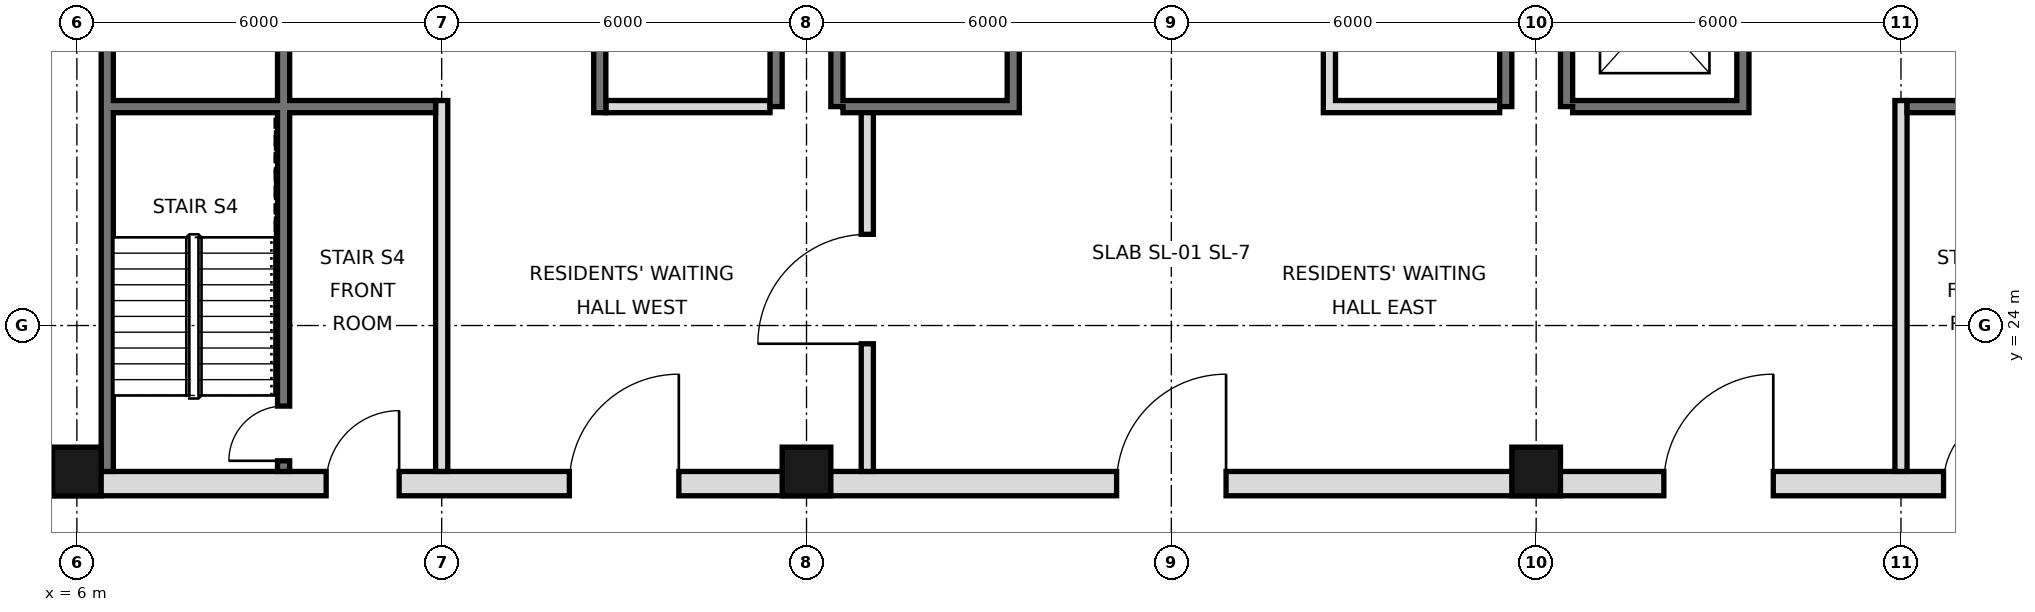
"""IFC4 building model, lengths in metres.
Left out: names, types, materials, properties, quantities, classifications, styles, units other than length and angle.
Written with IfcOpenShell. Run it as: python <this file> out.ifc"""

import sys

from ifc_helpers import new_model, si_unit, direction, frame, frame_2d, origin, origin_2d, place, context, subcontext, project, spatial, rectangle, hollow_rectangle, extrude, element, fill, save


model = new_model("IFC4")
c1 = context("Model", 3, precision=1e-05, world=origin(), true_north=direction((0.0, 1.0)))
c2 = subcontext(c1, "Body", "Model", "MODEL_VIEW")
j1 = project(units=[si_unit("LENGTHUNIT", "METRE"), si_unit("PLANEANGLEUNIT", "RADIAN")], contexts=[c1])
p1 = place(None, origin())
s1 = spatial("IfcSite", under=j1, at=p1, CompositionType="ELEMENT")
p2 = place(p1, origin())
s2 = spatial("IfcBuilding", under=s1, at=p2, CompositionType="ELEMENT")
p3 = place(p2, frame((0.0, 0.0, 178.0)))
s3 = spatial("IfcBuildingStorey", under=s2, at=p3, CompositionType="ELEMENT", Elevation=178.0)
for number, where, z_axis, x_axis in (
    (1, (6.0, 21.6, 0.0), (0.0, 0.0, 1.0), (1.0, 0.0, 0.0)),
    (2, (18.0, 21.6, 0.0), (0.0, 0.0, 1.0), (1.0, 0.0, 0.0)),
    (3, (30.0, 21.6, 0.0), (0.0, 0.0, 1.0), (1.0, 0.0, 0.0)),
):
    element("IfcColumn", number, at=place(p3, frame(where, z_axis=z_axis, x_axis=x_axis)), inside=s3, PredefinedType="COLUMN", context=c2, shape_type="SweptSolid", body=[
        extrude(hollow_rectangle(XDim=0.8, YDim=0.8, WallThickness=0.045, at=origin_2d()), origin(), (0.0, 0.0, 1.0), 3.6),
    ])
p4 = place(p3, frame((6.5, 21.6, 0.0), z_axis=(0.0, 0.0, 1.0), x_axis=(0.0, 1.0, 0.0)))
e4 = element("IfcWall", 4, at=p4, inside=s3, PredefinedType="SOLIDWALL", context=c2, shape_type="SweptSolid", body=[
    extrude(rectangle(XDim=23.5, YDim=0.2, at=frame_2d((11.75, 0.0))), origin(), (0.0, 0.0, 1.0), 3.42),
])
for number, where, z_axis, x_axis in (
    (5, (17.5, 27.6, 0.0), (0.0, 0.0, 1.0), (0.0, 1.0, 0.0)),
    (6, (18.5, 27.6, 0.0), (0.0, 0.0, 1.0), (0.0, 1.0, 0.0)),
    (7, (29.5, 27.6, 0.0), (0.0, 0.0, 1.0), (0.0, 1.0, 0.0)),
    (8, (30.5, 27.6, 0.0), (0.0, 0.0, 1.0), (0.0, 1.0, 0.0)),
):
    element("IfcWall", number, at=place(p3, frame(where, z_axis=z_axis, x_axis=x_axis)), inside=s3, PredefinedType="SOLIDWALL", context=c2, shape_type="SweptSolid", body=[
        extrude(rectangle(XDim=17.5, YDim=0.2, at=frame_2d((8.75, 0.0))), origin(), (0.0, 0.0, 1.0), 3.42),
    ])
p5 = place(p3, frame((5.6, 21.4, 0.0), z_axis=(0.0, 0.0, 1.0), x_axis=(1.0, 0.0, 0.0)))
e9 = element("IfcWall", 9, at=p5, inside=s3, PredefinedType="SOLIDWALL", context=c2, shape_type="SweptSolid", body=[
    extrude(rectangle(XDim=36.8, YDim=0.4, at=frame_2d((18.4, 0.0))), origin(), (0.0, 0.0, 1.0), 3.42),
])
p6 = place(p5, frame((8.5, 0.0, 0.0)))
e10 = element("IfcOpeningElement", 10, at=p6, cuts=e9, PredefinedType="OPENING", context=c2, shape_type="SweptSolid", body=[
    extrude(rectangle(XDim=1.8, YDim=2.1, at=frame_2d((0.9, 1.05))), frame((0.0, 0.21, 0.0), z_axis=(0.0, -1.0, 0.0), x_axis=(1.0, 0.0, 0.0)), (0.0, 0.0, 1.0), 0.42),
])
p7 = place(p5, frame((17.5, 0.0, 0.0)))
e11 = element("IfcOpeningElement", 11, at=p7, cuts=e9, PredefinedType="OPENING", context=c2, shape_type="SweptSolid", body=[
    extrude(rectangle(XDim=1.8, YDim=2.1, at=frame_2d((0.9, 1.05))), frame((0.0, 0.21, 0.0), z_axis=(0.0, -1.0, 0.0), x_axis=(1.0, 0.0, 0.0)), (0.0, 0.0, 1.0), 0.42),
])
p8 = place(p5, frame((26.5, 0.0, 0.0)))
e12 = element("IfcOpeningElement", 12, at=p8, cuts=e9, PredefinedType="OPENING", context=c2, shape_type="SweptSolid", body=[
    extrude(rectangle(XDim=1.8, YDim=2.1, at=frame_2d((0.9, 1.05))), frame((0.0, 0.21, 0.0), z_axis=(0.0, -1.0, 0.0), x_axis=(1.0, 0.0, 0.0)), (0.0, 0.0, 1.0), 0.42),
])
p9 = place(p5, frame((4.5, 0.0, 0.0)))
e13 = element("IfcOpeningElement", 13, at=p9, cuts=e9, PredefinedType="OPENING", context=c2, shape_type="SweptSolid", body=[
    extrude(rectangle(XDim=1.2, YDim=2.1, at=frame_2d((0.6, 1.05))), frame((0.0, 0.21, 0.0), z_axis=(0.0, -1.0, 0.0), x_axis=(1.0, 0.0, 0.0)), (0.0, 0.0, 1.0), 0.42),
])
p10 = place(p5, frame((31.1, 0.0, 0.0)))
e14 = element("IfcOpeningElement", 14, at=p10, cuts=e9, PredefinedType="OPENING", context=c2, shape_type="SweptSolid", body=[
    extrude(rectangle(XDim=1.2, YDim=2.1, at=frame_2d((0.6, 1.05))), frame((0.0, 0.21, 0.0), z_axis=(0.0, -1.0, 0.0), x_axis=(1.0, 0.0, 0.0)), (0.0, 0.0, 1.0), 0.42),
])
p11 = place(p3, frame((19.0, 21.6, 0.0), z_axis=(0.0, 0.0, 1.0), x_axis=(0.0, 1.0, 0.0)))
e15 = element("IfcWall", 15, at=p11, inside=s3, PredefinedType="PARTITIONING", context=c2, shape_type="SweptSolid", body=[
    extrude(rectangle(XDim=6.0, YDim=0.2, at=frame_2d((3.0, 0.0))), origin(), (0.0, 0.0, 1.0), 3.42),
])
p12 = place(p11, frame((2.1, 0.0, 0.0)))
e16 = element("IfcOpeningElement", 16, at=p12, cuts=e15, PredefinedType="OPENING", context=c2, shape_type="SweptSolid", body=[
    extrude(rectangle(XDim=1.8, YDim=2.1, at=frame_2d((0.9, 1.05))), frame((0.0, 0.11, 0.0), z_axis=(0.0, -1.0, 0.0), x_axis=(1.0, 0.0, 0.0)), (0.0, 0.0, 1.0), 0.22),
])
p13 = place(p3, frame((12.0, 21.6, 0.0), z_axis=(0.0, 0.0, 1.0), x_axis=(0.0, 1.0, 0.0)))
e17 = element("IfcWall", 17, at=p13, inside=s3, PredefinedType="PARTITIONING", context=c2, shape_type="SweptSolid", body=[
    extrude(rectangle(XDim=6.1, YDim=0.2, at=frame_2d((3.05, 0.0))), origin(), (0.0, 0.0, 1.0), 3.42),
])
p14 = place(p3, frame((14.6, 27.5, 0.0), z_axis=(0.0, 0.0, 1.0), x_axis=(0.0, 1.0, 0.0)))
e18 = element("IfcWall", 18, at=p14, inside=s3, PredefinedType="SOLIDWALL", context=c2, shape_type="SweptSolid", body=[
    extrude(rectangle(XDim=17.5, YDim=0.2, at=frame_2d((8.75, 0.0))), origin(), (0.0, 0.0, 1.0), 3.42),
])
p15 = place(p14, frame((15.4, 0.0, 0.0)))
e19 = element("IfcOpeningElement", 19, at=p15, cuts=e18, PredefinedType="OPENING", context=c2, shape_type="SweptSolid", body=[
    extrude(rectangle(XDim=1.1, YDim=2.1, at=frame_2d((0.55, 1.05))), frame((0.0, 0.11, 0.0), z_axis=(0.0, -1.0, 0.0), x_axis=(1.0, 0.0, 0.0)), (0.0, 0.0, 1.0), 0.22),
])
p16 = place(p14, frame((2.7, 0.0, 0.0)))
e20 = element("IfcOpeningElement", 20, at=p16, cuts=e18, PredefinedType="OPENING", context=c2, shape_type="SweptSolid", body=[
    extrude(rectangle(XDim=1.0, YDim=2.1, at=frame_2d((0.5, 1.05))), frame((0.0, 0.11, 0.0), z_axis=(0.0, -1.0, 0.0), x_axis=(1.0, 0.0, 0.0)), (0.0, 0.0, 1.0), 0.22),
])
p17 = place(p14, frame((9.9, 0.0, 0.0)))
e21 = element("IfcOpeningElement", 21, at=p17, cuts=e18, PredefinedType="OPENING", context=c2, shape_type="SweptSolid", body=[
    extrude(rectangle(XDim=0.9, YDim=2.1, at=frame_2d((0.45, 1.05))), frame((0.0, 0.11, 0.0), z_axis=(0.0, -1.0, 0.0), x_axis=(1.0, 0.0, 0.0)), (0.0, 0.0, 1.0), 0.22),
])
p18 = place(p3, frame((21.4, 27.5, 0.0), z_axis=(0.0, 0.0, 1.0), x_axis=(0.0, 1.0, 0.0)))
e22 = element("IfcWall", 22, at=p18, inside=s3, PredefinedType="SOLIDWALL", context=c2, shape_type="SweptSolid", body=[
    extrude(rectangle(XDim=17.5, YDim=0.2, at=frame_2d((8.75, 0.0))), origin(), (0.0, 0.0, 1.0), 3.42),
])
p19 = place(p18, frame((9.8, 0.0, 0.0)))
e23 = element("IfcOpeningElement", 23, at=p19, cuts=e22, PredefinedType="OPENING", context=c2, shape_type="SweptSolid", body=[
    extrude(rectangle(XDim=1.0, YDim=2.1, at=frame_2d((0.5, 1.05))), frame((0.0, 0.11, 0.0), z_axis=(0.0, -1.0, 0.0), x_axis=(1.0, 0.0, 0.0)), (0.0, 0.0, 1.0), 0.22),
])
p20 = place(p18, frame((7.4, 0.0, 0.0)))
e24 = element("IfcOpeningElement", 24, at=p20, cuts=e22, PredefinedType="OPENING", context=c2, shape_type="SweptSolid", body=[
    extrude(rectangle(XDim=0.9, YDim=2.1, at=frame_2d((0.45, 1.05))), frame((0.0, 0.11, 0.0), z_axis=(0.0, -1.0, 0.0), x_axis=(1.0, 0.0, 0.0)), (0.0, 0.0, 1.0), 0.22),
])
p21 = place(p3, frame((26.6, 27.5, 0.0), z_axis=(0.0, 0.0, 1.0), x_axis=(0.0, 1.0, 0.0)))
e25 = element("IfcWall", 25, at=p21, inside=s3, PredefinedType="SOLIDWALL", context=c2, shape_type="SweptSolid", body=[
    extrude(rectangle(XDim=17.5, YDim=0.2, at=frame_2d((8.75, 0.0))), origin(), (0.0, 0.0, 1.0), 3.42),
])
p22 = place(p21, frame((4.3, 0.0, 0.0)))
e26 = element("IfcOpeningElement", 26, at=p22, cuts=e25, PredefinedType="OPENING", context=c2, shape_type="SweptSolid", body=[
    extrude(rectangle(XDim=0.9, YDim=2.1, at=frame_2d((0.45, 1.05))), frame((0.0, 0.11, 0.0), z_axis=(0.0, -1.0, 0.0), x_axis=(1.0, 0.0, 0.0)), (0.0, 0.0, 1.0), 0.22),
])
p23 = place(p21, frame((10.35, 0.0, 0.0)))
e27 = element("IfcOpeningElement", 27, at=p23, cuts=e25, PredefinedType="OPENING", context=c2, shape_type="SweptSolid", body=[
    extrude(rectangle(XDim=1.0, YDim=2.1, at=frame_2d((0.5, 1.05))), frame((0.0, 0.11, 0.0), z_axis=(0.0, -1.0, 0.0), x_axis=(1.0, 0.0, 0.0)), (0.0, 0.0, 1.0), 0.22),
])
p24 = place(p3, frame((33.4, 27.5, 0.0), z_axis=(0.0, 0.0, 1.0), x_axis=(0.0, 1.0, 0.0)))
e28 = element("IfcWall", 28, at=p24, inside=s3, PredefinedType="SOLIDWALL", context=c2, shape_type="SweptSolid", body=[
    extrude(rectangle(XDim=17.5, YDim=0.2, at=frame_2d((8.75, 0.0))), origin(), (0.0, 0.0, 1.0), 3.42),
])
p25 = place(p24, frame((1.1, 0.0, 0.0)))
e29 = element("IfcOpeningElement", 29, at=p25, cuts=e28, PredefinedType="OPENING", context=c2, shape_type="SweptSolid", body=[
    extrude(rectangle(XDim=1.1, YDim=2.1, at=frame_2d((0.55, 1.05))), frame((0.0, 0.11, 0.0), z_axis=(0.0, -1.0, 0.0), x_axis=(1.0, 0.0, 0.0)), (0.0, 0.0, 1.0), 0.22),
])
p26 = place(p24, frame((4.2, 0.0, 0.0)))
e30 = element("IfcOpeningElement", 30, at=p26, cuts=e28, PredefinedType="OPENING", context=c2, shape_type="SweptSolid", body=[
    extrude(rectangle(XDim=1.1, YDim=2.1, at=frame_2d((0.55, 1.05))), frame((0.0, 0.11, 0.0), z_axis=(0.0, -1.0, 0.0), x_axis=(1.0, 0.0, 0.0)), (0.0, 0.0, 1.0), 0.22),
])
p27 = place(p24, frame((15.4, 0.0, 0.0)))
e31 = element("IfcOpeningElement", 31, at=p27, cuts=e28, PredefinedType="OPENING", context=c2, shape_type="SweptSolid", body=[
    extrude(rectangle(XDim=1.1, YDim=2.1, at=frame_2d((0.55, 1.05))), frame((0.0, 0.11, 0.0), z_axis=(0.0, -1.0, 0.0), x_axis=(1.0, 0.0, 0.0)), (0.0, 0.0, 1.0), 0.22),
])
p28 = place(p24, frame((9.9, 0.0, 0.0)))
e32 = element("IfcOpeningElement", 32, at=p28, cuts=e28, PredefinedType="OPENING", context=c2, shape_type="SweptSolid", body=[
    extrude(rectangle(XDim=0.9, YDim=2.1, at=frame_2d((0.45, 1.05))), frame((0.0, 0.11, 0.0), z_axis=(0.0, -1.0, 0.0), x_axis=(1.0, 0.0, 0.0)), (0.0, 0.0, 1.0), 0.22),
])
p29 = place(p3, frame((36.0, 21.6, 0.0), z_axis=(0.0, 0.0, 1.0), x_axis=(0.0, 1.0, 0.0)))
e33 = element("IfcWall", 33, at=p29, inside=s3, PredefinedType="PARTITIONING", context=c2, shape_type="SweptSolid", body=[
    extrude(rectangle(XDim=6.1, YDim=0.2, at=frame_2d((3.05, 0.0))), origin(), (0.0, 0.0, 1.0), 3.42),
])
p30 = place(p3, frame((9.4, 21.6, 0.0), z_axis=(0.0, 0.0, 1.0), x_axis=(0.0, 1.0, 0.0)))
e34 = element("IfcWall", 34, at=p30, inside=s3, PredefinedType="SOLIDWALL", context=c2, shape_type="SweptSolid", body=[
    extrude(rectangle(XDim=23.4, YDim=0.2, at=frame_2d((11.7, 0.0))), origin(), (0.0, 0.0, 1.0), 3.42),
])
p31 = place(p30, frame((7.95, 0.0, 0.0)))
e35 = element("IfcOpeningElement", 35, at=p31, cuts=e34, PredefinedType="OPENING", context=c2, shape_type="SweptSolid", body=[
    extrude(rectangle(XDim=1.0, YDim=2.1, at=frame_2d((0.5, 1.05))), frame((0.0, 0.11, 0.0), z_axis=(0.0, -1.0, 0.0), x_axis=(1.0, 0.0, 0.0)), (0.0, 0.0, 1.0), 0.22),
])
p32 = place(p30, frame((12.6, 0.0, 0.0)))
e36 = element("IfcOpeningElement", 36, at=p32, cuts=e34, PredefinedType="OPENING", context=c2, shape_type="SweptSolid", body=[
    extrude(rectangle(XDim=1.0, YDim=2.1, at=frame_2d((0.5, 1.05))), frame((0.0, 0.11, 0.0), z_axis=(0.0, -1.0, 0.0), x_axis=(1.0, 0.0, 0.0)), (0.0, 0.0, 1.0), 0.22),
])
p33 = place(p30, frame((15.7, 0.0, 0.0)))
e37 = element("IfcOpeningElement", 37, at=p33, cuts=e34, PredefinedType="OPENING", context=c2, shape_type="SweptSolid", body=[
    extrude(rectangle(XDim=1.0, YDim=2.1, at=frame_2d((0.5, 1.05))), frame((0.0, 0.11, 0.0), z_axis=(0.0, -1.0, 0.0), x_axis=(1.0, 0.0, 0.0)), (0.0, 0.0, 1.0), 0.22),
])
p34 = place(p30, frame((0.175, 0.0, 0.0)))
e38 = element("IfcOpeningElement", 38, at=p34, cuts=e34, PredefinedType="OPENING", context=c2, shape_type="SweptSolid", body=[
    extrude(rectangle(XDim=0.9, YDim=2.1, at=frame_2d((0.45, 1.05))), frame((0.0, 0.11, 0.0), z_axis=(0.0, -1.0, 0.0), x_axis=(1.0, 0.0, 0.0)), (0.0, 0.0, 1.0), 0.22),
])
p35 = place(p3, frame((14.7, 27.6, 0.0), z_axis=(0.0, 0.0, 1.0), x_axis=(1.0, 0.0, 0.0)))
e39 = element("IfcWall", 39, at=p35, inside=s3, PredefinedType="PARTITIONING", context=c2, shape_type="SweptSolid", body=[
    extrude(rectangle(XDim=2.7, YDim=0.2, at=frame_2d((1.35, 0.0))), origin(), (0.0, 0.0, 1.0), 3.42),
])
for number, where, z_axis, x_axis in (
    (40, (18.6, 27.6, 0.0), (0.0, 0.0, 1.0), (1.0, 0.0, 0.0)),
    (41, (26.7, 27.6, 0.0), (0.0, 0.0, 1.0), (1.0, 0.0, 0.0)),
    (42, (30.6, 27.6, 0.0), (0.0, 0.0, 1.0), (1.0, 0.0, 0.0)),
):
    element("IfcWall", number, at=place(p3, frame(where, z_axis=z_axis, x_axis=x_axis)), inside=s3, PredefinedType="SOLIDWALL", context=c2, shape_type="SweptSolid", body=[
        extrude(rectangle(XDim=2.7, YDim=0.2, at=frame_2d((1.35, 0.0))), origin(), (0.0, 0.0, 1.0), 3.42),
    ])
for number, where, z_axis, x_axis in (
    (43, (36.1, 27.6, 0.0), (0.0, 0.0, 1.0), (1.0, 0.0, 0.0)),
    (44, (6.6, 27.6, 0.0), (0.0, 0.0, 1.0), (1.0, 0.0, 0.0)),
):
    element("IfcWall", number, at=place(p3, frame(where, z_axis=z_axis, x_axis=x_axis)), inside=s3, PredefinedType="SOLIDWALL", context=c2, shape_type="SweptSolid", body=[
        extrude(rectangle(XDim=5.3, YDim=0.2, at=frame_2d((2.65, 0.0))), origin(), (0.0, 0.0, 1.0), 3.42),
    ])
p36 = place(p6, frame((1.8, 0.0, 0.0), z_axis=(0.0, 0.0, 1.0), x_axis=(-1.0, 0.0, 0.0)))
e45 = element("IfcDoor", 45, at=p36, inside=s3, OperationType="SINGLE_SWING_LEFT", PredefinedType="DOOR", context=c2, shape_type="SweptSolid", body=[
    extrude(rectangle(XDim=1.8, YDim=2.1, at=frame_2d((0.9, 1.05))), frame((0.0, 0.025, 0.0), z_axis=(0.0, -1.0, 0.0), x_axis=(1.0, 0.0, 0.0)), (0.0, 0.0, 1.0), 0.05),
])
fill(e10, e45)
p37 = place(p12, origin())
e46 = element("IfcDoor", 46, at=p37, inside=s3, OperationType="SINGLE_SWING_LEFT", PredefinedType="DOOR", context=c2, shape_type="SweptSolid", body=[
    extrude(rectangle(XDim=1.8, YDim=2.1, at=frame_2d((0.9, 1.05))), frame((0.0, 0.025, 0.0), z_axis=(0.0, -1.0, 0.0), x_axis=(1.0, 0.0, 0.0)), (0.0, 0.0, 1.0), 0.05),
])
fill(e16, e46)
p38 = place(p7, frame((1.8, 0.0, 0.0), z_axis=(0.0, 0.0, 1.0), x_axis=(-1.0, 0.0, 0.0)))
e47 = element("IfcDoor", 47, at=p38, inside=s3, OperationType="SINGLE_SWING_LEFT", PredefinedType="DOOR", context=c2, shape_type="SweptSolid", body=[
    extrude(rectangle(XDim=1.8, YDim=2.1, at=frame_2d((0.9, 1.05))), frame((0.0, 0.025, 0.0), z_axis=(0.0, -1.0, 0.0), x_axis=(1.0, 0.0, 0.0)), (0.0, 0.0, 1.0), 0.05),
])
fill(e11, e47)
p39 = place(p8, frame((1.8, 0.0, 0.0), z_axis=(0.0, 0.0, 1.0), x_axis=(-1.0, 0.0, 0.0)))
e48 = element("IfcDoor", 48, at=p39, inside=s3, OperationType="SINGLE_SWING_LEFT", PredefinedType="DOOR", context=c2, shape_type="SweptSolid", body=[
    extrude(rectangle(XDim=1.8, YDim=2.1, at=frame_2d((0.9, 1.05))), frame((0.0, 0.025, 0.0), z_axis=(0.0, -1.0, 0.0), x_axis=(1.0, 0.0, 0.0)), (0.0, 0.0, 1.0), 0.05),
])
fill(e12, e48)
p40 = place(p9, frame((1.2, 0.0, 0.0), z_axis=(0.0, 0.0, 1.0), x_axis=(-1.0, 0.0, 0.0)))
e49 = element("IfcDoor", 49, at=p40, inside=s3, OperationType="SINGLE_SWING_LEFT", PredefinedType="DOOR", context=c2, shape_type="SweptSolid", body=[
    extrude(rectangle(XDim=1.2, YDim=2.1, at=frame_2d((0.6, 1.05))), frame((0.0, 0.025, 0.0), z_axis=(0.0, -1.0, 0.0), x_axis=(1.0, 0.0, 0.0)), (0.0, 0.0, 1.0), 0.05),
])
fill(e13, e49)
p41 = place(p10, frame((1.2, 0.0, 0.0), z_axis=(0.0, 0.0, 1.0), x_axis=(-1.0, 0.0, 0.0)))
e50 = element("IfcDoor", 50, at=p41, inside=s3, OperationType="SINGLE_SWING_LEFT", PredefinedType="DOOR", context=c2, shape_type="SweptSolid", body=[
    extrude(rectangle(XDim=1.2, YDim=2.1, at=frame_2d((0.6, 1.05))), frame((0.0, 0.025, 0.0), z_axis=(0.0, -1.0, 0.0), x_axis=(1.0, 0.0, 0.0)), (0.0, 0.0, 1.0), 0.05),
])
fill(e14, e50)
p42 = place(p34, origin())
e51 = element("IfcDoor", 51, at=p42, inside=s3, OperationType="SINGLE_SWING_LEFT", PredefinedType="DOOR", context=c2, shape_type="SweptSolid", body=[
    extrude(rectangle(XDim=0.9, YDim=2.1, at=frame_2d((0.45, 1.05))), frame((0.0, 0.025, 0.0), z_axis=(0.0, -1.0, 0.0), x_axis=(1.0, 0.0, 0.0)), (0.0, 0.0, 1.0), 0.05),
])
fill(e38, e51)
save(model, sys.argv[1])
